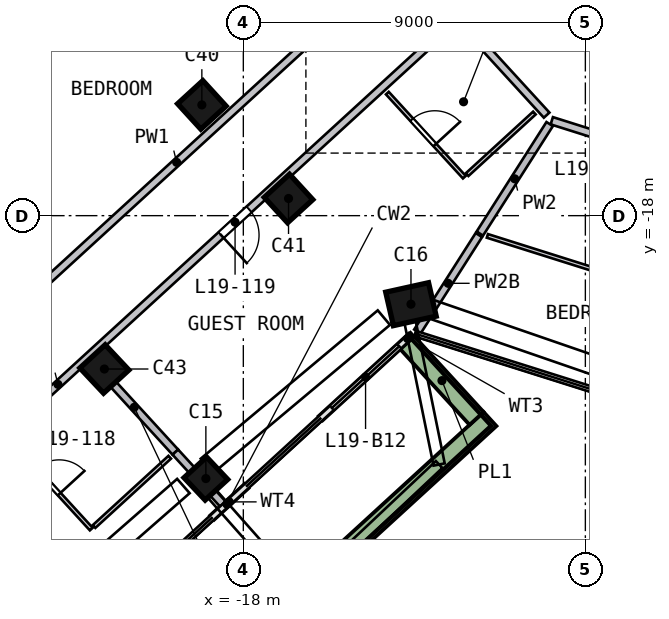
"""IFC4 building model, lengths in metres.
Left out: names, types, materials, properties, quantities, classifications, styles, units other than length and angle.
Written with IfcOpenShell. Run it as: python <this file> out.ifc"""

import sys

from ifc_helpers import new_model, si_unit, direction, frame, frame_2d, origin, origin_2d, place, context, subcontext, project, spatial, rectangle, extrude, element, fill, save


model = new_model("IFC4")
c1 = context("Model", 3, precision=1e-05, world=origin(), true_north=direction((0.0, 1.0)))
c2 = subcontext(c1, "Body", "Model", "MODEL_VIEW")
j1 = project(units=[si_unit("LENGTHUNIT", "METRE"), si_unit("PLANEANGLEUNIT", "RADIAN")], contexts=[c1])
p1 = place(None, origin())
s1 = spatial("IfcSite", under=j1, at=p1, CompositionType="ELEMENT")
p2 = place(p1, origin())
s2 = spatial("IfcBuilding", under=s1, at=p2, CompositionType="ELEMENT")
p3 = place(p2, frame((0.0, 0.0, 86.0)))
s3 = spatial("IfcBuildingStorey", under=s2, at=p3, CompositionType="ELEMENT", Elevation=86.0)
p4 = place(p3, frame((-19.195, -24.871, 0.0), z_axis=(0.171406096, -0.03880182, 0.984436067), x_axis=(0.723979713, 0.682658621, -0.099149293)))
e1 = element("IfcColumn", 1, at=p4, inside=s3, PredefinedType="COLUMN", context=c2, shape_type="SweptSolid", body=[
    extrude(rectangle(XDim=0.8, YDim=0.8, at=origin_2d()), origin(), (0.0, 0.0, 1.0), 3.24),
])
p5 = place(p3, frame((-13.706, -20.252, 0.0), z_axis=(0.096843399, -0.064384897, 0.993214952), x_axis=(-0.971758684, -0.221869182, 0.080368695)))
e2 = element("IfcColumn", 2, at=p5, inside=s3, PredefinedType="COLUMN", context=c2, shape_type="SweptSolid", body=[
    extrude(rectangle(XDim=1.15, YDim=0.9, at=origin_2d()), origin(), (0.0, 0.0, 1.0), 3.212),
])
for number, where, z_axis, x_axis in (
    (3, (-19.178, -14.976, 0.0), (0.072, -0.091, 0.993), (-0.738, -0.674, -0.008)),
    (4, (-16.912, -17.452, 0.0), (0.084, -0.08, 0.993), (-0.737, -0.676, 0.008)),
):
    element("IfcColumn", number, at=place(p3, frame(where, z_axis=z_axis, x_axis=x_axis)), inside=s3, PredefinedType="COLUMN", context=c2, shape_type="SweptSolid", body=[
        extrude(rectangle(XDim=0.9, YDim=0.9, at=origin_2d()), origin(), (0.0, 0.0, 1.0), 3.211),
    ])
p6 = place(p3, frame((-21.849, -21.973, 0.0), z_axis=(0.158181383, -0.051469324, 0.986067725), x_axis=(-0.726790095, -0.682068323, 0.080987406)))
e5 = element("IfcColumn", 5, at=p6, inside=s3, PredefinedType="COLUMN", context=c2, shape_type="SweptSolid", body=[
    extrude(rectangle(XDim=0.9, YDim=0.9, at=origin_2d()), origin(), (0.0, 0.0, 1.0), 3.235),
])
p7 = place(p3, frame((-13.717, -5.516, 0.0), z_axis=(0.0, 0.0, 1.0), x_axis=(0.707106781, -0.707106781, 0.0)))
e6 = element("IfcWall", 6, at=p7, inside=s3, PredefinedType="SHEAR", context=c2, shape_type="SweptSolid", body=[
    extrude(rectangle(XDim=11.598, YDim=0.8, at=frame_2d((5.799, 0.0))), origin(), (0.0, 0.0, 1.0), 3.5),
])
p8 = place(p7, frame((2.099, 0.0, 0.0)))
e7 = element("IfcOpeningElement", 7, at=p8, cuts=e6, PredefinedType="OPENING", context=c2, shape_type="SweptSolid", body=[
    extrude(rectangle(XDim=1.2, YDim=2.1, at=frame_2d((0.6, 1.05))), frame((0.0, 0.41, 0.0), z_axis=(0.0, -1.0, 0.0), x_axis=(1.0, 0.0, 0.0)), (0.0, 0.0, 1.0), 0.82),
])
p9 = place(p3, frame((-22.281, -11.691, 0.0), z_axis=(0.0, 0.0, 1.0), x_axis=(-0.737483286, -0.675365385, 0.0)))
e8 = element("IfcWall", 8, at=p9, inside=s3, PredefinedType="SOLIDWALL", context=c2, shape_type="SweptSolid", body=[
    extrude(rectangle(XDim=3.293, YDim=0.15, at=frame_2d((1.647, 0.0))), origin(), (0.0, 0.0, 1.0), 2.425),
])
p10 = place(p9, frame((0.494, 0.0, 0.0)))
e9 = element("IfcOpeningElement", 9, at=p10, cuts=e8, PredefinedType="OPENING", context=c2, shape_type="SweptSolid", body=[
    extrude(rectangle(XDim=2.4, YDim=2.4, at=frame_2d((1.2, 1.2))), frame((0.0, 0.085, 0.0), z_axis=(0.0, -1.0, 0.0), x_axis=(1.0, 0.0, 0.0)), (0.0, 0.0, 1.0), 0.17),
])
p11 = place(p3, frame((-15.963, -23.329, 0.0), z_axis=(0.0, 0.0, 1.0), x_axis=(0.73747709, 0.67537215, 0.0)))
e10 = element("IfcWall", 10, at=p11, inside=s3, PredefinedType="SOLIDWALL", context=c2, shape_type="SweptSolid", body=[
    extrude(rectangle(XDim=3.2, YDim=0.15, at=frame_2d((1.6, 0.0))), origin(), (0.0, 0.0, 1.0), 2.425),
])
p12 = place(p11, frame((0.4, 0.0, 0.0)))
e11 = element("IfcOpeningElement", 11, at=p12, cuts=e10, PredefinedType="OPENING", context=c2, shape_type="SweptSolid", body=[
    extrude(rectangle(XDim=2.4, YDim=2.4, at=frame_2d((1.2, 1.2))), frame((0.0, 0.085, 0.0), z_axis=(0.0, -1.0, 0.0), x_axis=(1.0, 0.0, 0.0)), (0.0, 0.0, 1.0), 0.17),
])
p13 = place(p3, frame((-18.821, -25.946, 0.0), z_axis=(0.0, 0.0, 1.0), x_axis=(0.737518091, 0.675327376, 0.0)))
e12 = element("IfcWall", 12, at=p13, inside=s3, PredefinedType="SOLIDWALL", context=c2, shape_type="SweptSolid", body=[
    extrude(rectangle(XDim=1.225, YDim=0.15, at=frame_2d((0.612, 0.0))), origin(), (0.0, 0.0, 1.0), 2.425),
])
p14 = place(p3, frame((-21.014, -32.056, 0.0), z_axis=(0.0, 0.0, 1.0), x_axis=(0.737507871, 0.675338537, 0.0)))
e13 = element("IfcWall", 13, at=p14, inside=s3, PredefinedType="SOLIDWALL", context=c2, shape_type="SweptSolid", body=[
    extrude(rectangle(XDim=12.888, YDim=0.5, at=frame_2d((6.444, 0.0))), origin(), (0.0, 0.0, 1.0), 0.7),
])
p15 = place(p3, frame((-11.862, -23.336, 0.0), z_axis=(0.0, 0.0, 1.0), x_axis=(-0.675351791, 0.737495734, 0.0)))
e14 = element("IfcWall", 14, at=p15, inside=s3, PredefinedType="SOLIDWALL", context=c2, shape_type="SweptSolid", body=[
    extrude(rectangle(XDim=2.699, YDim=0.5, at=frame_2d((1.35, 0.0))), origin(), (0.0, 0.0, 1.0), 0.7),
])
p16 = place(p3, frame((-28.508, -24.613, 0.0), z_axis=(0.0, 0.0, 1.0), x_axis=(0.737515881, 0.67532979, 0.0)))
e15 = element("IfcWall", 15, at=p16, inside=s3, PredefinedType="SOLIDWALL", context=c2, shape_type="SweptSolid", body=[
    extrude(rectangle(XDim=19.689, YDim=0.2, at=frame_2d((9.844, 0.0))), origin(), (0.0, 0.0, 1.0), 3.19),
])
p17 = place(p16, frame((2.85, 0.0, 0.0)))
e16 = element("IfcOpeningElement", 16, at=p17, cuts=e15, PredefinedType="OPENING", context=c2, shape_type="SweptSolid", body=[
    extrude(rectangle(XDim=1.0, YDim=2.1, at=frame_2d((0.5, 1.05))), frame((0.0, 0.11, 0.0), z_axis=(0.0, -1.0, 0.0), x_axis=(1.0, 0.0, 0.0)), (0.0, 0.0, 1.0), 0.22),
])
p18 = place(p3, frame((-12.502, -12.939, 0.0), z_axis=(0.0, 0.0, 1.0), x_axis=(-0.737510226, -0.675335966, 0.0)))
e17 = element("IfcWall", 17, at=p18, inside=s3, PredefinedType="SOLIDWALL", context=c2, shape_type="SweptSolid", body=[
    extrude(rectangle(XDim=19.688, YDim=0.2, at=frame_2d((9.844, 0.0))), origin(), (0.0, 0.0, 1.0), 3.19),
])
p19 = place(p18, frame((7.25, 0.0, 0.0)))
e18 = element("IfcOpeningElement", 18, at=p19, cuts=e17, PredefinedType="OPENING", context=c2, shape_type="SweptSolid", body=[
    extrude(rectangle(XDim=1.0, YDim=2.1, at=frame_2d((0.5, 1.05))), frame((0.0, 0.11, 0.0), z_axis=(0.0, -1.0, 0.0), x_axis=(1.0, 0.0, 0.0)), (0.0, 0.0, 1.0), 0.22),
])
p20 = place(p3, frame((-12.354, -12.804, 0.0), z_axis=(0.0, 0.0, 1.0), x_axis=(0.675324927, -0.737520334, 0.0)))
e19 = element("IfcWall", 19, at=p20, inside=s3, PredefinedType="SOLIDWALL", context=c2, shape_type="SweptSolid", body=[
    extrude(rectangle(XDim=3.458, YDim=0.2, at=frame_2d((1.729, 0.0))), origin(), (0.0, 0.0, 1.0), 3.19),
])
p21 = place(p3, frame((-0.808, -18.367, 0.0), z_axis=(0.0, 0.0, 1.0), x_axis=(-0.953616003, 0.301025777, 0.0)))
e20 = element("IfcWall", 20, at=p21, inside=s3, PredefinedType="SOLIDWALL", context=c2, shape_type="SweptSolid", body=[
    extrude(rectangle(XDim=9.517, YDim=0.2, at=frame_2d((4.758, 0.0))), origin(), (0.0, 0.0, 1.0), 3.19),
])
p22 = place(p21, frame((1.9, 0.0, 0.0)))
e21 = element("IfcOpeningElement", 21, at=p22, cuts=e20, PredefinedType="OPENING", context=c2, shape_type="SweptSolid", body=[
    extrude(rectangle(XDim=1.0, YDim=2.1, at=frame_2d((0.5, 1.05))), frame((0.0, 0.11, 0.0), z_axis=(0.0, -1.0, 0.0), x_axis=(1.0, 0.0, 0.0)), (0.0, 0.0, 1.0), 0.22),
])
p23 = place(p3, frame((-21.95, -21.862, 0.0), z_axis=(0.0, 0.0, 1.0), x_axis=(0.675334151, -0.737511888, 0.0)))
e22 = element("IfcWall", 22, at=p23, inside=s3, PredefinedType="SOLIDWALL", context=c2, shape_type="SweptSolid", body=[
    extrude(rectangle(XDim=3.2, YDim=0.2, at=frame_2d((1.6, 0.0))), origin(), (0.0, 0.0, 1.0), 3.19),
])
p24 = place(p3, frame((-19.789, -24.222, 0.0), z_axis=(0.0, 0.0, 1.0), x_axis=(0.675348094, -0.73749912, 0.0)))
e23 = element("IfcWall", 23, at=p24, inside=s3, PredefinedType="SOLIDWALL", context=c2, shape_type="SweptSolid", body=[
    extrude(rectangle(XDim=1.85, YDim=0.2, at=frame_2d((0.925, 0.0))), origin(), (0.0, 0.0, 1.0), 3.19),
])
p25 = place(p3, frame((-11.802, -18.51, 0.0), z_axis=(0.0, 0.0, 1.0), x_axis=(-0.537578234, -0.843213877, 0.0)))
e24 = element("IfcWall", 24, at=p25, inside=s3, PredefinedType="SOLIDWALL", context=c2, shape_type="SweptSolid", body=[
    extrude(rectangle(XDim=3.011, YDim=0.2, at=frame_2d((1.506, 0.0))), origin(), (0.0, 0.0, 1.0), 2.69),
])
p26 = place(p3, frame((-9.939, -15.589, 0.0), z_axis=(0.0, 0.0, 1.0), x_axis=(-0.537591617, -0.843205345, 0.0)))
e25 = element("IfcWall", 25, at=p26, inside=s3, PredefinedType="SOLIDWALL", context=c2, shape_type="SweptSolid", body=[
    extrude(rectangle(XDim=3.418, YDim=0.2, at=frame_2d((1.709, 0.0))), origin(), (0.0, 0.0, 1.0), 3.19),
])
p27 = place(p3, frame((-24.163, -23.888, 0.0), z_axis=(0.0, 0.0, 1.0), x_axis=(0.675334151, -0.737511888, 0.0)))
e26 = element("IfcWall", 26, at=p27, inside=s3, PredefinedType="PARTITIONING", context=c2, shape_type="SweptSolid", body=[
    extrude(rectangle(XDim=3.2, YDim=0.1, at=frame_2d((1.6, 0.0))), origin(), (0.0, 0.0, 1.0), 3.19),
])
p28 = place(p27, frame((1.05, 0.0, 0.0)))
e27 = element("IfcOpeningElement", 27, at=p28, cuts=e26, PredefinedType="OPENING", context=c2, shape_type="SweptSolid", body=[
    extrude(rectangle(XDim=0.9, YDim=2.1, at=frame_2d((0.45, 1.05))), frame((0.0, 0.06, 0.0), z_axis=(0.0, -1.0, 0.0), x_axis=(1.0, 0.0, 0.0)), (0.0, 0.0, 1.0), 0.12),
])
p29 = place(p3, frame((-21.928, -26.181, 0.0), z_axis=(0.0, 0.0, 1.0), x_axis=(0.737484349, 0.675364223, 0.0)))
e28 = element("IfcWall", 28, at=p29, inside=s3, PredefinedType="PARTITIONING", context=c2, shape_type="SweptSolid", body=[
    extrude(rectangle(XDim=2.7, YDim=0.1, at=frame_2d((1.35, 0.0))), origin(), (0.0, 0.0, 1.0), 3.19),
])
p30 = place(p3, frame((-14.21, -14.775, 0.0), z_axis=(0.0, 0.0, 1.0), x_axis=(0.675337617, -0.737508714, 0.0)))
e29 = element("IfcWall", 29, at=p30, inside=s3, PredefinedType="PARTITIONING", context=c2, shape_type="SweptSolid", body=[
    extrude(rectangle(XDim=3.0, YDim=0.1, at=frame_2d((1.5, 0.0))), origin(), (0.0, 0.0, 1.0), 3.19),
])
p31 = place(p30, frame((0.95, 0.0, 0.0)))
e30 = element("IfcOpeningElement", 30, at=p31, cuts=e29, PredefinedType="OPENING", context=c2, shape_type="SweptSolid", body=[
    extrude(rectangle(XDim=0.9, YDim=2.1, at=frame_2d((0.45, 1.05))), frame((0.0, 0.06, 0.0), z_axis=(0.0, -1.0, 0.0), x_axis=(1.0, 0.0, 0.0)), (0.0, 0.0, 1.0), 0.12),
])
p32 = place(p3, frame((-10.341, -15.299, 0.0), z_axis=(0.0, 0.0, 1.0), x_axis=(-0.737550957, -0.675291483, 0.0)))
e31 = element("IfcWall", 31, at=p32, inside=s3, PredefinedType="PARTITIONING", context=c2, shape_type="SweptSolid", body=[
    extrude(rectangle(XDim=2.4, YDim=0.1, at=frame_2d((1.2, 0.0))), origin(), (0.0, 0.0, 1.0), 3.19),
])
p33 = place(p3, frame((-11.578, -18.532, 0.0), z_axis=(0.0, 0.0, 1.0), x_axis=(0.953617524, -0.301020959, 0.0)))
e32 = element("IfcWall", 32, at=p33, inside=s3, PredefinedType="PARTITIONING", context=c2, shape_type="SweptSolid", body=[
    extrude(rectangle(XDim=3.704, YDim=0.1, at=frame_2d((1.852, 0.0))), origin(), (0.0, 0.0, 1.0), 3.19),
])
p34 = place(p12, origin())
e33 = element("IfcDoor", 33, at=p34, inside=s3, OperationType="SLIDING_TO_RIGHT", PredefinedType="DOOR", context=c2, shape_type="SweptSolid", body=[
    extrude(rectangle(XDim=2.4, YDim=2.4, at=frame_2d((1.2, 1.2))), frame((0.0, 0.025, 0.0), z_axis=(0.0, -1.0, 0.0), x_axis=(1.0, 0.0, 0.0)), (0.0, 0.0, 1.0), 0.05),
])
fill(e11, e33)
p35 = place(p28, origin())
e34 = element("IfcDoor", 34, at=p35, inside=s3, OperationType="SINGLE_SWING_RIGHT", PredefinedType="DOOR", context=c2, shape_type="SweptSolid", body=[
    extrude(rectangle(XDim=0.9, YDim=2.1, at=frame_2d((0.45, 1.05))), frame((0.0, 0.025, 0.0), z_axis=(0.0, -1.0, 0.0), x_axis=(1.0, 0.0, 0.0)), (0.0, 0.0, 1.0), 0.05),
])
fill(e27, e34)
p36 = place(p19, origin())
e35 = element("IfcDoor", 35, at=p36, inside=s3, OperationType="SINGLE_SWING_RIGHT", PredefinedType="DOOR", context=c2, shape_type="SweptSolid", body=[
    extrude(rectangle(XDim=1.0, YDim=2.1, at=frame_2d((0.5, 1.05))), frame((0.0, 0.025, 0.0), z_axis=(0.0, -1.0, 0.0), x_axis=(1.0, 0.0, 0.0)), (0.0, 0.0, 1.0), 0.05),
])
fill(e18, e35)
p37 = place(p31, origin())
e36 = element("IfcDoor", 36, at=p37, inside=s3, OperationType="SINGLE_SWING_RIGHT", PredefinedType="DOOR", context=c2, shape_type="SweptSolid", body=[
    extrude(rectangle(XDim=0.9, YDim=2.1, at=frame_2d((0.45, 1.05))), frame((0.0, 0.025, 0.0), z_axis=(0.0, -1.0, 0.0), x_axis=(1.0, 0.0, 0.0)), (0.0, 0.0, 1.0), 0.05),
])
fill(e30, e36)
save(model, sys.argv[1])
